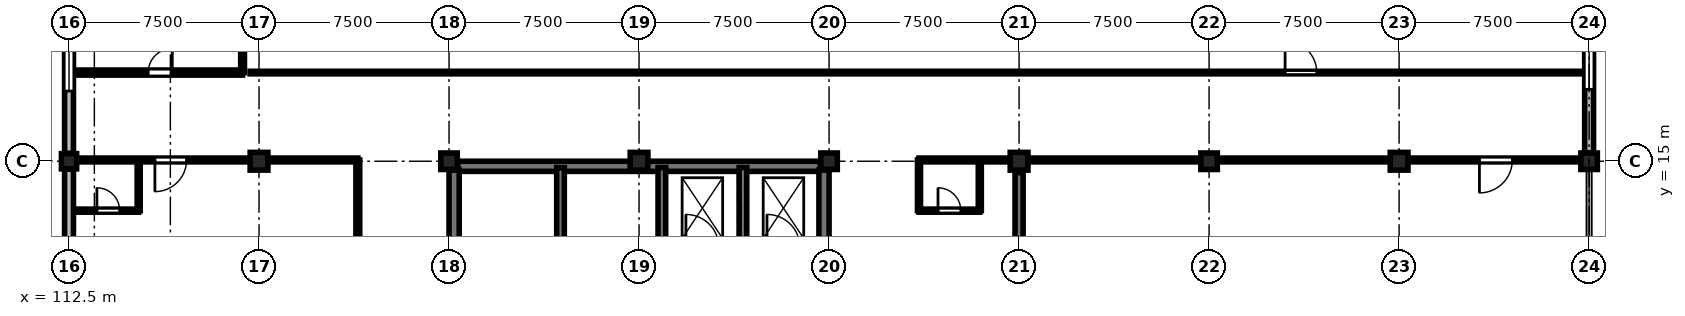
"""IFC4 building model, lengths in metres.
Left out: names, types, materials, properties, quantities, classifications, styles, units other than length and angle.
Written with IfcOpenShell. Run it as: python <this file> out.ifc"""

import sys

from ifc_helpers import new_model, si_unit, direction, frame, frame_2d, origin, origin_2d, place, context, subcontext, project, spatial, rectangle, extrude, element, fill, save


model = new_model("IFC4")
c1 = context("Model", 3, precision=1e-05, world=origin(), true_north=direction((0.0, 1.0)))
c2 = subcontext(c1, "Body", "Model", "MODEL_VIEW")
j1 = project(units=[si_unit("LENGTHUNIT", "METRE"), si_unit("PLANEANGLEUNIT", "RADIAN")], contexts=[c1])
p1 = place(None, origin())
s1 = spatial("IfcSite", under=j1, at=p1, CompositionType="ELEMENT")
p2 = place(p1, origin())
s2 = spatial("IfcBuilding", under=s1, at=p2, CompositionType="ELEMENT")
p3 = place(p2, frame((0.0, 0.0, 9.3)))
s3 = spatial("IfcBuildingStorey", under=s2, at=p3, CompositionType="ELEMENT", Elevation=9.3)
p4 = place(p3, frame((112.5, 15.0, 0.0), z_axis=(0.0, 0.0, 1.0), x_axis=(1.0, 0.0, 0.0)))
e1 = element("IfcColumn", 1, at=p4, inside=s3, PredefinedType="COLUMN", context=c2, shape_type="SweptSolid", body=[
    extrude(rectangle(XDim=0.6, YDim=0.6, at=origin_2d()), origin(), (0.0, 0.0, 1.0), 4.8),
])
p5 = place(p3, frame((120.0, 15.0, 0.0), z_axis=(0.0, 0.0, 1.0), x_axis=(1.0, 0.0, 0.0)))
e2 = element("IfcColumn", 2, at=p5, inside=s3, PredefinedType="COLUMN", context=c2, shape_type="SweptSolid", body=[
    extrude(rectangle(XDim=0.7, YDim=0.7, at=origin_2d()), origin(), (0.0, 0.0, 1.0), 4.8),
])
p6 = place(p3, frame((127.5, 15.0, 0.0), z_axis=(0.0, 0.0, 1.0), x_axis=(1.0, 0.0, 0.0)))
e3 = element("IfcColumn", 3, at=p6, inside=s3, PredefinedType="COLUMN", context=c2, shape_type="SweptSolid", body=[
    extrude(rectangle(XDim=0.65, YDim=0.65, at=origin_2d()), origin(), (0.0, 0.0, 1.0), 4.8),
])
p7 = place(p3, frame((135.0, 15.0, 0.0), z_axis=(0.0, 0.0, 1.0), x_axis=(1.0, 0.0, 0.0)))
e4 = element("IfcColumn", 4, at=p7, inside=s3, PredefinedType="COLUMN", context=c2, shape_type="SweptSolid", body=[
    extrude(rectangle(XDim=0.7, YDim=0.7, at=origin_2d()), origin(), (0.0, 0.0, 1.0), 4.8),
])
p8 = place(p3, frame((142.5, 15.0, 0.0), z_axis=(0.0, 0.0, 1.0), x_axis=(1.0, 0.0, 0.0)))
e5 = element("IfcColumn", 5, at=p8, inside=s3, PredefinedType="COLUMN", context=c2, shape_type="SweptSolid", body=[
    extrude(rectangle(XDim=0.65, YDim=0.65, at=origin_2d()), origin(), (0.0, 0.0, 1.0), 4.8),
])
p9 = place(p3, frame((150.0, 15.0, 0.0), z_axis=(0.0, 0.0, 1.0), x_axis=(1.0, 0.0, 0.0)))
e6 = element("IfcColumn", 6, at=p9, inside=s3, PredefinedType="COLUMN", context=c2, shape_type="SweptSolid", body=[
    extrude(rectangle(XDim=0.7, YDim=0.7, at=origin_2d()), origin(), (0.0, 0.0, 1.0), 4.8),
])
p10 = place(p3, frame((157.5, 15.0, 0.0), z_axis=(0.0, 0.0, 1.0), x_axis=(1.0, 0.0, 0.0)))
e7 = element("IfcColumn", 7, at=p10, inside=s3, PredefinedType="COLUMN", context=c2, shape_type="SweptSolid", body=[
    extrude(rectangle(XDim=0.65, YDim=0.65, at=origin_2d()), origin(), (0.0, 0.0, 1.0), 4.8),
])
p11 = place(p3, frame((165.0, 15.0, 0.0), z_axis=(0.0, 0.0, 1.0), x_axis=(1.0, 0.0, 0.0)))
e8 = element("IfcColumn", 8, at=p11, inside=s3, PredefinedType="COLUMN", context=c2, shape_type="SweptSolid", body=[
    extrude(rectangle(XDim=0.7, YDim=0.7, at=origin_2d()), origin(), (0.0, 0.0, 1.0), 4.8),
])
p12 = place(p3, frame((172.5, 15.0, 0.0), z_axis=(0.0, 0.0, 1.0), x_axis=(1.0, 0.0, 0.0)))
e9 = element("IfcColumn", 9, at=p12, inside=s3, PredefinedType="COLUMN", context=c2, shape_type="SweptSolid", body=[
    extrude(rectangle(XDim=0.65, YDim=0.65, at=origin_2d()), origin(), (0.0, 0.0, 1.0), 4.8),
])
p13 = place(p3, frame((150.0, 7.95, 0.0), z_axis=(0.0, 0.0, 1.0), x_axis=(0.0, 1.0, 0.0)))
e10 = element("IfcWall", 10, at=p13, inside=s3, PredefinedType="SHEAR", context=c2, shape_type="SweptSolid", body=[
    extrude(rectangle(XDim=6.6, YDim=0.32, at=frame_2d((3.3, 0.0))), origin(), (0.0, 0.0, 1.0), 4.0),
])
p14 = place(p3, frame((112.5, 7.81, 0.0), z_axis=(0.0, 0.0, 1.0), x_axis=(0.0, 1.0, 0.0)))
e11 = element("IfcWall", 11, at=p14, inside=s3, PredefinedType="STANDARD", context=c2, shape_type="SweptSolid", body=[
    extrude(rectangle(XDim=6.88, YDim=0.35, at=frame_2d((3.44, 0.0))), origin(), (0.0, 0.0, 1.0), 3.95),
])
p15 = place(p14, frame((2.84, 0.0, 0.9)))
e12 = element("IfcOpeningElement", 12, at=p15, cuts=e11, PredefinedType="OPENING", context=c2, shape_type="SweptSolid", body=[
    extrude(rectangle(XDim=1.2, YDim=2.1, at=frame_2d((0.6, 1.05))), frame((0.0, 0.185, 0.0), z_axis=(0.0, -1.0, 0.0), x_axis=(1.0, 0.0, 0.0)), (0.0, 0.0, 1.0), 0.37),
])
p16 = place(p3, frame((112.5, 15.31, 0.0), z_axis=(0.0, 0.0, 1.0), x_axis=(0.0, 1.0, 0.0)))
e13 = element("IfcWall", 13, at=p16, inside=s3, PredefinedType="STANDARD", context=c2, shape_type="SweptSolid", body=[
    extrude(rectangle(XDim=7.02, YDim=0.35, at=frame_2d((3.51, 0.0))), origin(), (0.0, 0.0, 1.0), 3.95),
])
p17 = place(p16, frame((2.46, 0.0, 0.9)))
e14 = element("IfcOpeningElement", 14, at=p17, cuts=e13, PredefinedType="OPENING", context=c2, shape_type="SweptSolid", body=[
    extrude(rectangle(XDim=2.1, YDim=2.1, at=frame_2d((1.05, 1.05))), frame((0.0, 0.185, 0.0), z_axis=(0.0, -1.0, 0.0), x_axis=(1.0, 0.0, 0.0)), (0.0, 0.0, 1.0), 0.37),
])
p18 = place(p3, frame((172.5, 22.14, 0.0), z_axis=(0.0, 0.0, 1.0), x_axis=(0.0, -1.0, 0.0)))
e15 = element("IfcWall", 15, at=p18, inside=s3, PredefinedType="STANDARD", context=c2, shape_type="SweptSolid", body=[
    extrude(rectangle(XDim=6.805, YDim=0.35, at=frame_2d((3.402, 0.0))), origin(), (0.0, 0.0, 1.0), 3.95),
])
p19 = place(p18, frame((2.502, 0.0, 0.9)))
e16 = element("IfcOpeningElement", 16, at=p19, cuts=e15, PredefinedType="OPENING", context=c2, shape_type="SweptSolid", body=[
    extrude(rectangle(XDim=1.8, YDim=1.8, at=frame_2d((0.9, 0.9))), frame((0.0, 0.185, 0.0), z_axis=(0.0, -1.0, 0.0), x_axis=(1.0, 0.0, 0.0)), (0.0, 0.0, 1.0), 0.37),
])
p20 = place(p3, frame((127.85, 14.8, 0.0), z_axis=(0.0, 0.0, 1.0), x_axis=(1.0, 0.0, 0.0)))
e17 = element("IfcWall", 17, at=p20, inside=s3, PredefinedType="SHEAR", context=c2, shape_type="SweptSolid", body=[
    extrude(rectangle(XDim=14.3, YDim=0.4, at=frame_2d((7.15, 0.0))), origin(), (0.0, 0.0, 1.0), 4.55),
])
p21 = place(p3, frame((127.7, 7.85, 0.0), z_axis=(0.0, 0.0, 1.0), x_axis=(0.0, 1.0, 0.0)))
e18 = element("IfcWall", 18, at=p21, inside=s3, PredefinedType="SHEAR", context=c2, shape_type="SweptSolid", body=[
    extrude(rectangle(XDim=6.8, YDim=0.4, at=frame_2d((3.4, 0.0))), origin(), (0.0, 0.0, 1.0), 4.55),
])
p22 = place(p3, frame((142.3, 11.6, 0.0), z_axis=(0.0, 0.0, 1.0), x_axis=(0.0, 1.0, 0.0)))
e19 = element("IfcWall", 19, at=p22, inside=s3, PredefinedType="SHEAR", context=c2, shape_type="SweptSolid", body=[
    extrude(rectangle(XDim=3.05, YDim=0.4, at=frame_2d((1.525, 0.0))), origin(), (0.0, 0.0, 1.0), 4.55),
])
for number, where, z_axis, x_axis in (
    (20, (131.9, 11.6, 0.0), (0.0, 0.0, 1.0), (0.0, 1.0, 0.0)),
    (21, (135.9, 11.6, 0.0), (0.0, 0.0, 1.0), (0.0, 1.0, 0.0)),
    (22, (139.1, 11.6, 0.0), (0.0, 0.0, 1.0), (0.0, 1.0, 0.0)),
):
    element("IfcWall", number, at=place(p3, frame(where, z_axis=z_axis, x_axis=x_axis)), inside=s3, PredefinedType="SHEAR", context=c2, shape_type="SweptSolid", body=[
        extrude(rectangle(XDim=3.15, YDim=0.3, at=frame_2d((1.575, 0.0))), origin(), (0.0, 0.0, 1.0), 4.55),
    ])
p23 = place(p3, frame((172.15, 15.05, 0.0), z_axis=(0.0, 0.0, 1.0), x_axis=(-1.0, 0.0, 0.0)))
e23 = element("IfcWall", 23, at=p23, inside=s3, PredefinedType="PARTITIONING", context=c2, shape_type="SweptSolid", body=[
    extrude(rectangle(XDim=26.1, YDim=0.15, at=frame_2d((13.05, 0.0))), origin(), (0.0, 0.0, 1.0), 3.985),
])
p24 = place(p23, frame((2.68, 0.0, 0.0)))
e24 = element("IfcOpeningElement", 24, at=p24, cuts=e23, PredefinedType="OPENING", context=c2, shape_type="SweptSolid", body=[
    extrude(rectangle(XDim=1.3, YDim=2.2, at=frame_2d((0.65, 1.1))), frame((0.0, 0.085, 0.0), z_axis=(0.0, -1.0, 0.0), x_axis=(1.0, 0.0, 0.0)), (0.0, 0.0, 1.0), 0.17),
])
p25 = place(p3, frame((146.05, 13.05, 0.0), z_axis=(0.0, 0.0, 1.0), x_axis=(1.0, 0.0, 0.0)))
e25 = element("IfcWall", 25, at=p25, inside=s3, PredefinedType="PARTITIONING", context=c2, shape_type="SweptSolid", body=[
    extrude(rectangle(XDim=2.4, YDim=0.12, at=frame_2d((1.2, 0.0))), origin(), (0.0, 0.0, 1.0), 4.535),
])
p26 = place(p25, frame((0.75, 0.0, 0.0)))
e26 = element("IfcOpeningElement", 26, at=p26, cuts=e25, PredefinedType="OPENING", context=c2, shape_type="SweptSolid", body=[
    extrude(rectangle(XDim=0.9, YDim=2.1, at=frame_2d((0.45, 1.05))), frame((0.0, 0.07, 0.0), z_axis=(0.0, -1.0, 0.0), x_axis=(1.0, 0.0, 0.0)), (0.0, 0.0, 1.0), 0.14),
])
p27 = place(p3, frame((148.45, 13.05, 0.0), z_axis=(0.0, 0.0, 1.0), x_axis=(0.0, 1.0, 0.0)))
e27 = element("IfcWall", 27, at=p27, inside=s3, PredefinedType="PARTITIONING", context=c2, shape_type="SweptSolid", body=[
    extrude(rectangle(XDim=2.0, YDim=0.12, at=frame_2d((1.0, 0.0))), origin(), (0.0, 0.0, 1.0), 4.535),
])
p28 = place(p3, frame((123.9, 15.05, 0.0), z_axis=(0.0, 0.0, 1.0), x_axis=(-1.0, 0.0, 0.0)))
e28 = element("IfcWall", 28, at=p28, inside=s3, PredefinedType="PARTITIONING", context=c2, shape_type="SweptSolid", body=[
    extrude(rectangle(XDim=11.05, YDim=0.15, at=frame_2d((5.525, 0.0))), origin(), (0.0, 0.0, 1.0), 3.985),
])
p29 = place(p28, frame((6.76, 0.0, 0.0)))
e29 = element("IfcOpeningElement", 29, at=p29, cuts=e28, PredefinedType="OPENING", context=c2, shape_type="SweptSolid", body=[
    extrude(rectangle(XDim=1.25, YDim=2.2, at=frame_2d((0.625, 1.1))), frame((0.0, 0.085, 0.0), z_axis=(0.0, -1.0, 0.0), x_axis=(1.0, 0.0, 0.0)), (0.0, 0.0, 1.0), 0.17),
])
p30 = place(p3, frame((112.85, 13.05, 0.0), z_axis=(0.0, 0.0, 1.0), x_axis=(1.0, 0.0, 0.0)))
e30 = element("IfcWall", 30, at=p30, inside=s3, PredefinedType="PARTITIONING", context=c2, shape_type="SweptSolid", body=[
    extrude(rectangle(XDim=2.4, YDim=0.12, at=frame_2d((1.2, 0.0))), origin(), (0.0, 0.0, 1.0), 4.535),
])
p31 = place(p30, frame((0.75, 0.0, 0.0)))
e31 = element("IfcOpeningElement", 31, at=p31, cuts=e30, PredefinedType="OPENING", context=c2, shape_type="SweptSolid", body=[
    extrude(rectangle(XDim=0.9, YDim=2.1, at=frame_2d((0.45, 1.05))), frame((0.0, 0.07, 0.0), z_axis=(0.0, -1.0, 0.0), x_axis=(1.0, 0.0, 0.0)), (0.0, 0.0, 1.0), 0.14),
])
p32 = place(p3, frame((115.25, 13.05, 0.0), z_axis=(0.0, 0.0, 1.0), x_axis=(0.0, 1.0, 0.0)))
e32 = element("IfcWall", 32, at=p32, inside=s3, PredefinedType="PARTITIONING", context=c2, shape_type="SweptSolid", body=[
    extrude(rectangle(XDim=2.0, YDim=0.12, at=frame_2d((1.0, 0.0))), origin(), (0.0, 0.0, 1.0), 4.535),
])
p33 = place(p3, frame((112.85, 18.5, 0.0), z_axis=(0.0, 0.0, 1.0), x_axis=(1.0, 0.0, 0.0)))
e33 = element("IfcWall", 33, at=p33, inside=s3, PredefinedType="STANDARD", context=c2, shape_type="SweptSolid", body=[
    extrude(rectangle(XDim=6.5, YDim=0.2, at=frame_2d((3.25, 0.0))), origin(), (0.0, 0.0, 1.0), 4.535),
])
p34 = place(p33, frame((2.775, 0.0, 0.0)))
e34 = element("IfcOpeningElement", 34, at=p34, cuts=e33, PredefinedType="OPENING", context=c2, shape_type="SweptSolid", body=[
    extrude(rectangle(XDim=0.95, YDim=2.15, at=frame_2d((0.475, 1.075))), frame((0.0, 0.11, 0.0), z_axis=(0.0, -1.0, 0.0), x_axis=(1.0, 0.0, 0.0)), (0.0, 0.0, 1.0), 0.22),
])
p35 = place(p3, frame((119.65, 18.5, 0.0), z_axis=(0.0, 0.0, 1.0), x_axis=(1.0, 0.0, 0.0)))
e35 = element("IfcWall", 35, at=p35, inside=s3, PredefinedType="PARTITIONING", context=c2, shape_type="SweptSolid", body=[
    extrude(rectangle(XDim=52.5, YDim=0.1, at=frame_2d((26.25, 0.0))), origin(), (0.0, 0.0, 1.0), 4.535),
])
p36 = place(p35, frame((40.85, 0.0, 0.0)))
e36 = element("IfcOpeningElement", 36, at=p36, cuts=e35, PredefinedType="OPENING", context=c2, shape_type="SweptSolid", body=[
    extrude(rectangle(XDim=1.25, YDim=2.2, at=frame_2d((0.625, 1.1))), frame((0.0, 0.06, 0.0), z_axis=(0.0, -1.0, 0.0), x_axis=(1.0, 0.0, 0.0)), (0.0, 0.0, 1.0), 0.12),
])
p37 = place(p3, frame((123.9, 7.85, 0.0), z_axis=(0.0, 0.0, 1.0), x_axis=(0.0, 1.0, 0.0)))
e37 = element("IfcWall", 37, at=p37, inside=s3, PredefinedType="PARTITIONING", context=c2, shape_type="SweptSolid", body=[
    extrude(rectangle(XDim=7.2, YDim=0.15, at=frame_2d((3.6, 0.0))), origin(), (0.0, 0.0, 1.0), 4.535),
])
p38 = place(p3, frame((119.35, 18.5, 0.0), z_axis=(0.0, 0.0, 1.0), x_axis=(0.0, 1.0, 0.0)))
e38 = element("IfcWall", 38, at=p38, inside=s3, PredefinedType="PARTITIONING", context=c2, shape_type="SweptSolid", body=[
    extrude(rectangle(XDim=3.65, YDim=0.15, at=frame_2d((1.825, 0.0))), origin(), (0.0, 0.0, 1.0), 4.535),
])
p39 = place(p3, frame((146.05, 13.05, 0.0), z_axis=(0.0, 0.0, 1.0), x_axis=(0.0, 1.0, 0.0)))
e39 = element("IfcWall", 39, at=p39, inside=s3, PredefinedType="PARTITIONING", context=c2, shape_type="SweptSolid", body=[
    extrude(rectangle(XDim=2.0, YDim=0.12, at=frame_2d((1.0, 0.0))), origin(), (0.0, 0.0, 1.0), 4.535),
])
p40 = place(p17, origin())
e40 = element("IfcWindow", 40, at=p40, inside=s3, PartitioningType="SINGLE_PANEL", PredefinedType="WINDOW", context=c2, shape_type="SweptSolid", body=[
    extrude(rectangle(XDim=2.1, YDim=2.1, at=frame_2d((1.05, 1.05))), frame((0.0, 0.03, 0.0), z_axis=(0.0, -1.0, 0.0), x_axis=(1.0, 0.0, 0.0)), (0.0, 0.0, 1.0), 0.06),
])
fill(e14, e40)
p41 = place(p19, origin())
e41 = element("IfcWindow", 41, at=p41, inside=s3, PartitioningType="SINGLE_PANEL", PredefinedType="WINDOW", context=c2, shape_type="SweptSolid", body=[
    extrude(rectangle(XDim=1.8, YDim=1.8, at=frame_2d((0.9, 0.9))), frame((0.0, 0.03, 0.0), z_axis=(0.0, -1.0, 0.0), x_axis=(1.0, 0.0, 0.0)), (0.0, 0.0, 1.0), 0.06),
])
fill(e16, e41)
p42 = place(p24, origin())
e42 = element("IfcDoor", 42, at=p42, inside=s3, OperationType="SINGLE_SWING_RIGHT", PredefinedType="DOOR", context=c2, shape_type="SweptSolid", body=[
    extrude(rectangle(XDim=1.3, YDim=2.2, at=frame_2d((0.65, 1.1))), frame((0.0, 0.025, 0.0), z_axis=(0.0, -1.0, 0.0), x_axis=(1.0, 0.0, 0.0)), (0.0, 0.0, 1.0), 0.05),
])
fill(e24, e42)
p43 = place(p26, origin())
e43 = element("IfcDoor", 43, at=p43, inside=s3, OperationType="SINGLE_SWING_LEFT", PredefinedType="DOOR", context=c2, shape_type="SweptSolid", body=[
    extrude(rectangle(XDim=0.9, YDim=2.1, at=frame_2d((0.45, 1.05))), frame((0.0, 0.025, 0.0), z_axis=(0.0, -1.0, 0.0), x_axis=(1.0, 0.0, 0.0)), (0.0, 0.0, 1.0), 0.05),
])
fill(e26, e43)
p44 = place(p29, origin())
e44 = element("IfcDoor", 44, at=p44, inside=s3, OperationType="SINGLE_SWING_RIGHT", PredefinedType="DOOR", context=c2, shape_type="SweptSolid", body=[
    extrude(rectangle(XDim=1.25, YDim=2.2, at=frame_2d((0.625, 1.1))), frame((0.0, 0.025, 0.0), z_axis=(0.0, -1.0, 0.0), x_axis=(1.0, 0.0, 0.0)), (0.0, 0.0, 1.0), 0.05),
])
fill(e29, e44)
p45 = place(p31, origin())
e45 = element("IfcDoor", 45, at=p45, inside=s3, OperationType="SINGLE_SWING_LEFT", PredefinedType="DOOR", context=c2, shape_type="SweptSolid", body=[
    extrude(rectangle(XDim=0.9, YDim=2.1, at=frame_2d((0.45, 1.05))), frame((0.0, 0.025, 0.0), z_axis=(0.0, -1.0, 0.0), x_axis=(1.0, 0.0, 0.0)), (0.0, 0.0, 1.0), 0.05),
])
fill(e31, e45)
p46 = place(p34, origin())
e46 = element("IfcDoor", 46, at=p46, inside=s3, OperationType="SINGLE_SWING_RIGHT", PredefinedType="DOOR", context=c2, shape_type="SweptSolid", body=[
    extrude(rectangle(XDim=0.95, YDim=2.15, at=frame_2d((0.475, 1.075))), frame((0.0, 0.025, 0.0), z_axis=(0.0, -1.0, 0.0), x_axis=(1.0, 0.0, 0.0)), (0.0, 0.0, 1.0), 0.05),
])
fill(e34, e46)
p47 = place(p36, origin())
e47 = element("IfcDoor", 47, at=p47, inside=s3, OperationType="SINGLE_SWING_LEFT", PredefinedType="DOOR", context=c2, shape_type="SweptSolid", body=[
    extrude(rectangle(XDim=1.25, YDim=2.2, at=frame_2d((0.625, 1.1))), frame((0.0, 0.025, 0.0), z_axis=(0.0, -1.0, 0.0), x_axis=(1.0, 0.0, 0.0)), (0.0, 0.0, 1.0), 0.05),
])
fill(e36, e47)
save(model, sys.argv[1])
